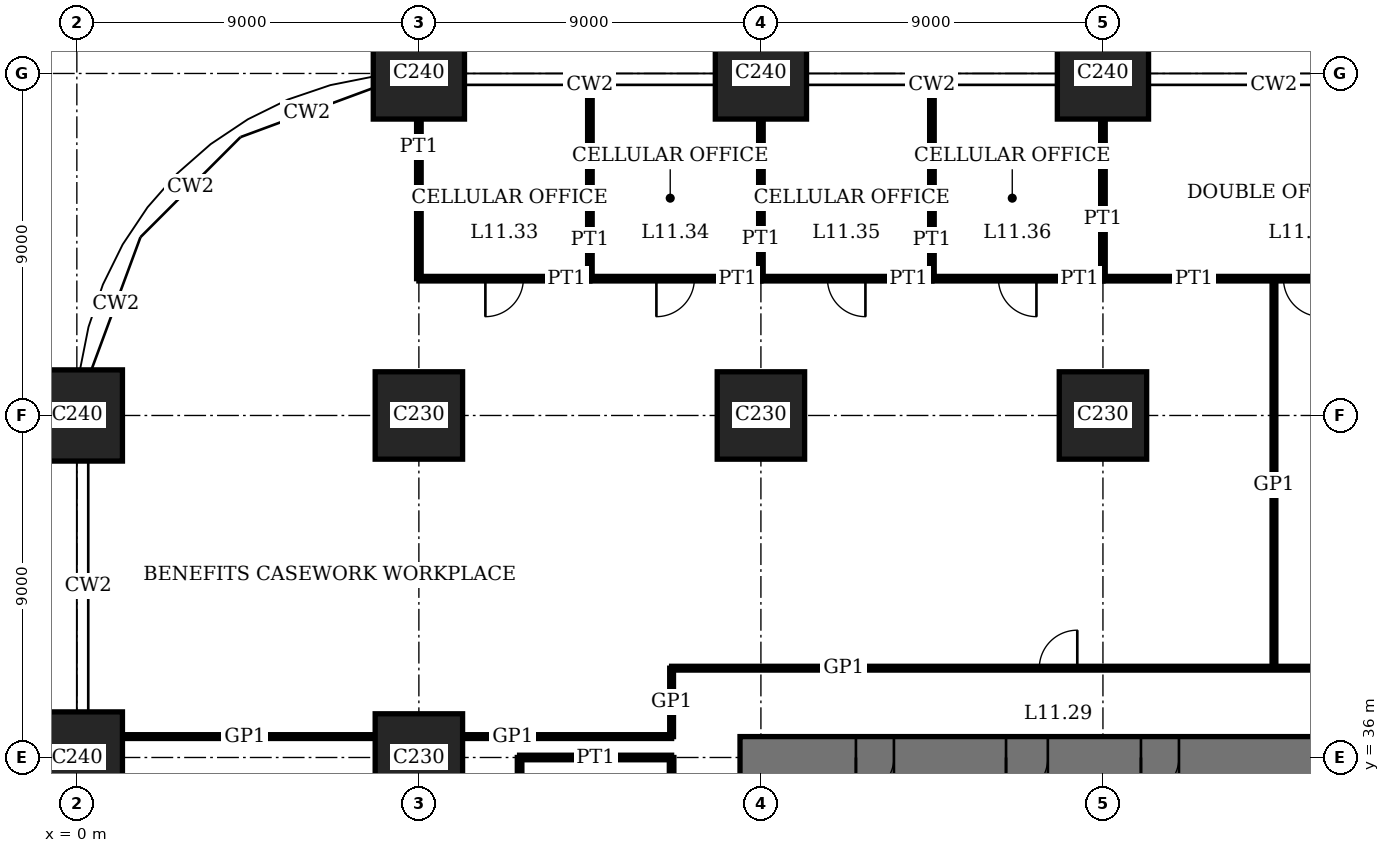
"""IFC4 building model, lengths in metres.
Left out: names, types, materials, properties, quantities, classifications, styles, units other than length and angle.
Written with IfcOpenShell. Run it as: python <this file> out.ifc"""

import sys

from ifc_helpers import new_model, si_unit, direction, frame, frame_2d, origin, origin_2d, place, context, subcontext, project, spatial, rectangle, extrude, element, fill, save


model = new_model("IFC4")
c1 = context("Model", 3, precision=1e-05, world=origin(), true_north=direction((0.0, 1.0)))
c2 = subcontext(c1, "Body", "Model", "MODEL_VIEW")
j1 = project(units=[si_unit("LENGTHUNIT", "METRE"), si_unit("PLANEANGLEUNIT", "RADIAN")], contexts=[c1])
p1 = place(None, origin())
s1 = spatial("IfcSite", under=j1, at=p1, CompositionType="ELEMENT")
p2 = place(p1, origin())
s2 = spatial("IfcBuilding", under=s1, at=p2, CompositionType="ELEMENT")
p3 = place(p2, frame((0.0, 0.0, 47.8)))
s3 = spatial("IfcBuildingStorey", under=s2, at=p3, CompositionType="ELEMENT", Elevation=47.8)
for number, where, z_axis, x_axis in (
    (1, (0.0, 36.0, 0.0), (0.0, 0.0, 1.0), (1.0, 0.0, 0.0)),
    (2, (0.0, 45.0, 0.0), (0.0, 0.0, 1.0), (1.0, 0.0, 0.0)),
):
    element("IfcColumn", number, at=place(p3, frame(where, z_axis=z_axis, x_axis=x_axis)), inside=s3, PredefinedType="COLUMN", context=c2, shape_type="SweptSolid", body=[
        extrude(rectangle(XDim=2.4, YDim=2.4, at=origin_2d()), origin(), (0.0, 0.0, 1.0), 4.0),
    ])
for number, where, z_axis, x_axis in (
    (3, (9.0, 36.0, 0.0), (0.0, 0.0, 1.0), (1.0, 0.0, 0.0)),
    (4, (9.0, 45.0, 0.0), (0.0, 0.0, 1.0), (1.0, 0.0, 0.0)),
):
    element("IfcColumn", number, at=place(p3, frame(where, z_axis=z_axis, x_axis=x_axis)), inside=s3, PredefinedType="COLUMN", context=c2, shape_type="SweptSolid", body=[
        extrude(rectangle(XDim=2.3, YDim=2.3, at=origin_2d()), origin(), (0.0, 0.0, 1.0), 4.0),
    ])
p4 = place(p3, frame((9.0, 54.0, 0.0), z_axis=(0.0, 0.0, 1.0), x_axis=(1.0, 0.0, 0.0)))
e5 = element("IfcColumn", 5, at=p4, inside=s3, PredefinedType="COLUMN", context=c2, shape_type="SweptSolid", body=[
    extrude(rectangle(XDim=2.4, YDim=2.4, at=origin_2d()), origin(), (0.0, 0.0, 1.0), 4.0),
])
p5 = place(p3, frame((18.0, 45.0, 0.0), z_axis=(0.0, 0.0, 1.0), x_axis=(1.0, 0.0, 0.0)))
e6 = element("IfcColumn", 6, at=p5, inside=s3, PredefinedType="COLUMN", context=c2, shape_type="SweptSolid", body=[
    extrude(rectangle(XDim=2.3, YDim=2.3, at=origin_2d()), origin(), (0.0, 0.0, 1.0), 4.0),
])
p6 = place(p3, frame((18.0, 54.0, 0.0), z_axis=(0.0, 0.0, 1.0), x_axis=(1.0, 0.0, 0.0)))
e7 = element("IfcColumn", 7, at=p6, inside=s3, PredefinedType="COLUMN", context=c2, shape_type="SweptSolid", body=[
    extrude(rectangle(XDim=2.4, YDim=2.4, at=origin_2d()), origin(), (0.0, 0.0, 1.0), 4.0),
])
p7 = place(p3, frame((27.0, 45.0, 0.0), z_axis=(0.0, 0.0, 1.0), x_axis=(1.0, 0.0, 0.0)))
e8 = element("IfcColumn", 8, at=p7, inside=s3, PredefinedType="COLUMN", context=c2, shape_type="SweptSolid", body=[
    extrude(rectangle(XDim=2.3, YDim=2.3, at=origin_2d()), origin(), (0.0, 0.0, 1.0), 4.0),
])
p8 = place(p3, frame((27.0, 54.0, 0.0), z_axis=(0.0, 0.0, 1.0), x_axis=(1.0, 0.0, 0.0)))
e9 = element("IfcColumn", 9, at=p8, inside=s3, PredefinedType="COLUMN", context=c2, shape_type="SweptSolid", body=[
    extrude(rectangle(XDim=2.4, YDim=2.4, at=origin_2d()), origin(), (0.0, 0.0, 1.0), 4.0),
])
p9 = place(p3, frame((45.55, 36.0, 0.0), z_axis=(0.0, 0.0, 1.0), x_axis=(-1.0, 0.0, 0.0)))
e10 = element("IfcWall", 10, at=p9, inside=s3, PredefinedType="SHEAR", context=c2, shape_type="SweptSolid", body=[
    extrude(rectangle(XDim=28.1, YDim=1.1, at=frame_2d((14.05, 0.0))), origin(), (0.0, 0.0, 1.0), 4.0),
])
p10 = place(p9, frame((11.55, 0.0, 0.0)))
e11 = element("IfcOpeningElement", 11, at=p10, cuts=e10, PredefinedType="OPENING", context=c2, shape_type="SweptSolid", body=[
    extrude(rectangle(XDim=1.0, YDim=2.4, at=frame_2d((0.5, 1.2))), frame((0.0, 0.56, 0.0), z_axis=(0.0, -1.0, 0.0), x_axis=(1.0, 0.0, 0.0)), (0.0, 0.0, 1.0), 1.12),
])
p11 = place(p9, frame((16.55, 0.0, 0.0)))
e12 = element("IfcOpeningElement", 12, at=p11, cuts=e10, PredefinedType="OPENING", context=c2, shape_type="SweptSolid", body=[
    extrude(rectangle(XDim=1.0, YDim=2.4, at=frame_2d((0.5, 1.2))), frame((0.0, 0.56, 0.0), z_axis=(0.0, -1.0, 0.0), x_axis=(1.0, 0.0, 0.0)), (0.0, 0.0, 1.0), 1.12),
])
p12 = place(p9, frame((20.0, 0.0, 0.0)))
e13 = element("IfcOpeningElement", 13, at=p12, cuts=e10, PredefinedType="OPENING", context=c2, shape_type="SweptSolid", body=[
    extrude(rectangle(XDim=1.1, YDim=2.4, at=frame_2d((0.55, 1.2))), frame((0.0, 0.56, 0.0), z_axis=(0.0, -1.0, 0.0), x_axis=(1.0, 0.0, 0.0)), (0.0, 0.0, 1.0), 1.12),
])
p13 = place(p9, frame((24.05, 0.0, 0.0)))
e14 = element("IfcOpeningElement", 14, at=p13, cuts=e10, PredefinedType="OPENING", context=c2, shape_type="SweptSolid", body=[
    extrude(rectangle(XDim=1.0, YDim=2.4, at=frame_2d((0.5, 1.2))), frame((0.0, 0.56, 0.0), z_axis=(0.0, -1.0, 0.0), x_axis=(1.0, 0.0, 0.0)), (0.0, 0.0, 1.0), 1.12),
])
p14 = place(p3, frame((11.65, 36.0, 0.0), z_axis=(0.0, 0.0, 1.0), x_axis=(1.0, 0.0, 0.0)))
e15 = element("IfcWall", 15, at=p14, inside=s3, PredefinedType="PARTITIONING", context=c2, shape_type="SweptSolid", body=[
    extrude(rectangle(XDim=4.0, YDim=0.12, at=frame_2d((2.0, 0.0))), origin(), (0.0, 0.0, 1.0), 3.05),
])
p15 = place(p3, frame((1.2, 36.55, 0.0), z_axis=(0.0, 0.0, 1.0), x_axis=(1.0, 0.0, 0.0)))
e16 = element("IfcWall", 16, at=p15, inside=s3, PredefinedType="PARTITIONING", context=c2, shape_type="SweptSolid", body=[
    extrude(rectangle(XDim=6.65, YDim=0.1, at=frame_2d((3.325, 0.0))), origin(), (0.0, 0.0, 1.0), 3.75),
])
p16 = place(p3, frame((10.15, 36.55, 0.0), z_axis=(0.0, 0.0, 1.0), x_axis=(1.0, 0.0, 0.0)))
e17 = element("IfcWall", 17, at=p16, inside=s3, PredefinedType="PARTITIONING", context=c2, shape_type="SweptSolid", body=[
    extrude(rectangle(XDim=5.5, YDim=0.1, at=frame_2d((2.75, 0.0))), origin(), (0.0, 0.0, 1.0), 3.75),
])
p17 = place(p3, frame((15.65, 38.35, 0.0), z_axis=(0.0, 0.0, 1.0), x_axis=(1.0, 0.0, 0.0)))
e18 = element("IfcWall", 18, at=p17, inside=s3, PredefinedType="PARTITIONING", context=c2, shape_type="SweptSolid", body=[
    extrude(rectangle(XDim=20.35, YDim=0.1, at=frame_2d((10.175, 0.0))), origin(), (0.0, 0.0, 1.0), 3.75),
])
p18 = place(p17, frame((9.675, 0.0, 0.0)))
e19 = element("IfcOpeningElement", 19, at=p18, cuts=e18, PredefinedType="OPENING", context=c2, shape_type="SweptSolid", body=[
    extrude(rectangle(XDim=1.0, YDim=2.4, at=frame_2d((0.5, 1.2))), frame((0.0, 0.06, 0.0), z_axis=(0.0, -1.0, 0.0), x_axis=(1.0, 0.0, 0.0)), (0.0, 0.0, 1.0), 0.12),
])
p19 = place(p3, frame((9.0, 48.6, 0.0), z_axis=(0.0, 0.0, 1.0), x_axis=(1.0, 0.0, 0.0)))
e20 = element("IfcWall", 20, at=p19, inside=s3, PredefinedType="PARTITIONING", context=c2, shape_type="SweptSolid", body=[
    extrude(rectangle(XDim=4.5, YDim=0.12, at=frame_2d((2.25, 0.0))), origin(), (0.0, 0.0, 1.0), 3.75),
])
p20 = place(p19, frame((1.75, 0.0, 0.0)))
e21 = element("IfcOpeningElement", 21, at=p20, cuts=e20, PredefinedType="OPENING", context=c2, shape_type="SweptSolid", body=[
    extrude(rectangle(XDim=1.0, YDim=2.4, at=frame_2d((0.5, 1.2))), frame((0.0, 0.07, 0.0), z_axis=(0.0, -1.0, 0.0), x_axis=(1.0, 0.0, 0.0)), (0.0, 0.0, 1.0), 0.14),
])
p21 = place(p3, frame((13.5, 48.6, 0.0), z_axis=(0.0, 0.0, 1.0), x_axis=(1.0, 0.0, 0.0)))
e22 = element("IfcWall", 22, at=p21, inside=s3, PredefinedType="PARTITIONING", context=c2, shape_type="SweptSolid", body=[
    extrude(rectangle(XDim=4.5, YDim=0.12, at=frame_2d((2.25, 0.0))), origin(), (0.0, 0.0, 1.0), 3.75),
])
p22 = place(p21, frame((1.75, 0.0, 0.0)))
e23 = element("IfcOpeningElement", 23, at=p22, cuts=e22, PredefinedType="OPENING", context=c2, shape_type="SweptSolid", body=[
    extrude(rectangle(XDim=1.0, YDim=2.4, at=frame_2d((0.5, 1.2))), frame((0.0, 0.07, 0.0), z_axis=(0.0, -1.0, 0.0), x_axis=(1.0, 0.0, 0.0)), (0.0, 0.0, 1.0), 0.14),
])
p23 = place(p3, frame((18.0, 48.6, 0.0), z_axis=(0.0, 0.0, 1.0), x_axis=(1.0, 0.0, 0.0)))
e24 = element("IfcWall", 24, at=p23, inside=s3, PredefinedType="PARTITIONING", context=c2, shape_type="SweptSolid", body=[
    extrude(rectangle(XDim=4.5, YDim=0.12, at=frame_2d((2.25, 0.0))), origin(), (0.0, 0.0, 1.0), 3.75),
])
p24 = place(p23, frame((1.75, 0.0, 0.0)))
e25 = element("IfcOpeningElement", 25, at=p24, cuts=e24, PredefinedType="OPENING", context=c2, shape_type="SweptSolid", body=[
    extrude(rectangle(XDim=1.0, YDim=2.4, at=frame_2d((0.5, 1.2))), frame((0.0, 0.07, 0.0), z_axis=(0.0, -1.0, 0.0), x_axis=(1.0, 0.0, 0.0)), (0.0, 0.0, 1.0), 0.14),
])
p25 = place(p3, frame((22.5, 48.6, 0.0), z_axis=(0.0, 0.0, 1.0), x_axis=(1.0, 0.0, 0.0)))
e26 = element("IfcWall", 26, at=p25, inside=s3, PredefinedType="PARTITIONING", context=c2, shape_type="SweptSolid", body=[
    extrude(rectangle(XDim=4.5, YDim=0.12, at=frame_2d((2.25, 0.0))), origin(), (0.0, 0.0, 1.0), 3.75),
])
p26 = place(p25, frame((1.75, 0.0, 0.0)))
e27 = element("IfcOpeningElement", 27, at=p26, cuts=e26, PredefinedType="OPENING", context=c2, shape_type="SweptSolid", body=[
    extrude(rectangle(XDim=1.0, YDim=2.4, at=frame_2d((0.5, 1.2))), frame((0.0, 0.07, 0.0), z_axis=(0.0, -1.0, 0.0), x_axis=(1.0, 0.0, 0.0)), (0.0, 0.0, 1.0), 0.14),
])
p27 = place(p3, frame((27.0, 48.6, 0.0), z_axis=(0.0, 0.0, 1.0), x_axis=(1.0, 0.0, 0.0)))
e28 = element("IfcWall", 28, at=p27, inside=s3, PredefinedType="PARTITIONING", context=c2, shape_type="SweptSolid", body=[
    extrude(rectangle(XDim=9.0, YDim=0.12, at=frame_2d((4.5, 0.0))), origin(), (0.0, 0.0, 1.0), 3.75),
])
p28 = place(p27, frame((4.75, 0.0, 0.0)))
e29 = element("IfcOpeningElement", 29, at=p28, cuts=e28, PredefinedType="OPENING", context=c2, shape_type="SweptSolid", body=[
    extrude(rectangle(XDim=1.0, YDim=2.4, at=frame_2d((0.5, 1.2))), frame((0.0, 0.07, 0.0), z_axis=(0.0, -1.0, 0.0), x_axis=(1.0, 0.0, 0.0)), (0.0, 0.0, 1.0), 0.14),
])
p29 = place(p3, frame((9.0, 48.6, 0.0), z_axis=(0.0, 0.0, 1.0), x_axis=(0.0, 1.0, 0.0)))
e30 = element("IfcWall", 30, at=p29, inside=s3, PredefinedType="PARTITIONING", context=c2, shape_type="SweptSolid", body=[
    extrude(rectangle(XDim=4.2, YDim=0.12, at=frame_2d((2.1, 0.0))), origin(), (0.0, 0.0, 1.0), 3.05),
])
p30 = place(p3, frame((11.65, 31.5, 0.0), z_axis=(0.0, 0.0, 1.0), x_axis=(0.0, 1.0, 0.0)))
e31 = element("IfcWall", 31, at=p30, inside=s3, PredefinedType="PARTITIONING", context=c2, shape_type="SweptSolid", body=[
    extrude(rectangle(XDim=4.5, YDim=0.12, at=frame_2d((2.25, 0.0))), origin(), (0.0, 0.0, 1.0), 3.75),
])
p31 = place(p30, frame((1.75, 0.0, 0.0)))
e32 = element("IfcOpeningElement", 32, at=p31, cuts=e31, PredefinedType="OPENING", context=c2, shape_type="SweptSolid", body=[
    extrude(rectangle(XDim=1.0, YDim=2.4, at=frame_2d((0.5, 1.2))), frame((0.0, 0.07, 0.0), z_axis=(0.0, -1.0, 0.0), x_axis=(1.0, 0.0, 0.0)), (0.0, 0.0, 1.0), 0.14),
])
p32 = place(p3, frame((13.5, 48.6, 0.0), z_axis=(0.0, 0.0, 1.0), x_axis=(0.0, 1.0, 0.0)))
e33 = element("IfcWall", 33, at=p32, inside=s3, PredefinedType="PARTITIONING", context=c2, shape_type="SweptSolid", body=[
    extrude(rectangle(XDim=5.09, YDim=0.12, at=frame_2d((2.545, 0.0))), origin(), (0.0, 0.0, 1.0), 3.75),
])
p33 = place(p3, frame((15.65, 31.5, 0.0), z_axis=(0.0, 0.0, 1.0), x_axis=(0.0, 1.0, 0.0)))
e34 = element("IfcWall", 34, at=p33, inside=s3, PredefinedType="PARTITIONING", context=c2, shape_type="SweptSolid", body=[
    extrude(rectangle(XDim=4.5, YDim=0.12, at=frame_2d((2.25, 0.0))), origin(), (0.0, 0.0, 1.0), 3.75),
])
p34 = place(p3, frame((15.65, 36.55, 0.0), z_axis=(0.0, 0.0, 1.0), x_axis=(0.0, 1.0, 0.0)))
e35 = element("IfcWall", 35, at=p34, inside=s3, PredefinedType="PARTITIONING", context=c2, shape_type="SweptSolid", body=[
    extrude(rectangle(XDim=1.8, YDim=0.1, at=frame_2d((0.9, 0.0))), origin(), (0.0, 0.0, 1.0), 3.75),
])
p35 = place(p3, frame((18.0, 48.6, 0.0), z_axis=(0.0, 0.0, 1.0), x_axis=(0.0, 1.0, 0.0)))
e36 = element("IfcWall", 36, at=p35, inside=s3, PredefinedType="PARTITIONING", context=c2, shape_type="SweptSolid", body=[
    extrude(rectangle(XDim=4.2, YDim=0.12, at=frame_2d((2.1, 0.0))), origin(), (0.0, 0.0, 1.0), 3.05),
])
p36 = place(p3, frame((22.5, 48.6, 0.0), z_axis=(0.0, 0.0, 1.0), x_axis=(0.0, 1.0, 0.0)))
e37 = element("IfcWall", 37, at=p36, inside=s3, PredefinedType="PARTITIONING", context=c2, shape_type="SweptSolid", body=[
    extrude(rectangle(XDim=5.09, YDim=0.12, at=frame_2d((2.545, 0.0))), origin(), (0.0, 0.0, 1.0), 3.75),
])
p37 = place(p3, frame((27.0, 48.6, 0.0), z_axis=(0.0, 0.0, 1.0), x_axis=(0.0, 1.0, 0.0)))
e38 = element("IfcWall", 38, at=p37, inside=s3, PredefinedType="PARTITIONING", context=c2, shape_type="SweptSolid", body=[
    extrude(rectangle(XDim=4.2, YDim=0.12, at=frame_2d((2.1, 0.0))), origin(), (0.0, 0.0, 1.0), 3.05),
])
p38 = place(p3, frame((31.5, 38.35, 0.0), z_axis=(0.0, 0.0, 1.0), x_axis=(0.0, 1.0, 0.0)))
e39 = element("IfcWall", 39, at=p38, inside=s3, PredefinedType="PARTITIONING", context=c2, shape_type="SweptSolid", body=[
    extrude(rectangle(XDim=10.26, YDim=0.1, at=frame_2d((5.13, 0.0))), origin(), (0.0, 0.0, 1.0), 3.75),
])
p39 = place(p11, origin())
e40 = element("IfcDoor", 40, at=p39, inside=s3, OperationType="SINGLE_SWING_LEFT", PredefinedType="DOOR", context=c2, shape_type="SweptSolid", body=[
    extrude(rectangle(XDim=1.0, YDim=2.4, at=frame_2d((0.5, 1.2))), frame((0.0, 0.025, 0.0), z_axis=(0.0, -1.0, 0.0), x_axis=(1.0, 0.0, 0.0)), (0.0, 0.0, 1.0), 0.05),
    extrude(rectangle(XDim=0.04, YDim=2.4, at=frame_2d((0.02, 1.2))), frame((0.0, 0.4, 0.0), z_axis=(0.0, -1.0, 0.0), x_axis=(1.0, 0.0, 0.0)), (0.0, 0.0, 1.0), 0.8),
    extrude(rectangle(XDim=0.04, YDim=2.4, at=frame_2d((0.98, 1.2))), frame((0.0, 0.4, 0.0), z_axis=(0.0, -1.0, 0.0), x_axis=(1.0, 0.0, 0.0)), (0.0, 0.0, 1.0), 0.8),
    extrude(rectangle(XDim=1.0, YDim=0.04, at=frame_2d((0.5, 2.38))), frame((0.0, 0.4, 0.0), z_axis=(0.0, -1.0, 0.0), x_axis=(1.0, 0.0, 0.0)), (0.0, 0.0, 1.0), 0.8),
])
fill(e12, e40)
p40 = place(p12, origin())
e41 = element("IfcDoor", 41, at=p40, inside=s3, OperationType="SINGLE_SWING_LEFT", PredefinedType="DOOR", context=c2, shape_type="SweptSolid", body=[
    extrude(rectangle(XDim=1.1, YDim=2.4, at=frame_2d((0.55, 1.2))), frame((0.0, 0.025, 0.0), z_axis=(0.0, -1.0, 0.0), x_axis=(1.0, 0.0, 0.0)), (0.0, 0.0, 1.0), 0.05),
    extrude(rectangle(XDim=0.04, YDim=2.4, at=frame_2d((0.02, 1.2))), frame((0.0, 0.44, 0.0), z_axis=(0.0, -1.0, 0.0), x_axis=(1.0, 0.0, 0.0)), (0.0, 0.0, 1.0), 0.88),
    extrude(rectangle(XDim=0.04, YDim=2.4, at=frame_2d((1.08, 1.2))), frame((0.0, 0.44, 0.0), z_axis=(0.0, -1.0, 0.0), x_axis=(1.0, 0.0, 0.0)), (0.0, 0.0, 1.0), 0.88),
    extrude(rectangle(XDim=1.1, YDim=0.04, at=frame_2d((0.55, 2.38))), frame((0.0, 0.44, 0.0), z_axis=(0.0, -1.0, 0.0), x_axis=(1.0, 0.0, 0.0)), (0.0, 0.0, 1.0), 0.88),
])
fill(e13, e41)
p41 = place(p13, origin())
e42 = element("IfcDoor", 42, at=p41, inside=s3, OperationType="SINGLE_SWING_LEFT", PredefinedType="DOOR", context=c2, shape_type="SweptSolid", body=[
    extrude(rectangle(XDim=1.0, YDim=2.4, at=frame_2d((0.5, 1.2))), frame((0.0, 0.025, 0.0), z_axis=(0.0, -1.0, 0.0), x_axis=(1.0, 0.0, 0.0)), (0.0, 0.0, 1.0), 0.05),
    extrude(rectangle(XDim=0.04, YDim=2.4, at=frame_2d((0.02, 1.2))), frame((0.0, 0.4, 0.0), z_axis=(0.0, -1.0, 0.0), x_axis=(1.0, 0.0, 0.0)), (0.0, 0.0, 1.0), 0.8),
    extrude(rectangle(XDim=0.04, YDim=2.4, at=frame_2d((0.98, 1.2))), frame((0.0, 0.4, 0.0), z_axis=(0.0, -1.0, 0.0), x_axis=(1.0, 0.0, 0.0)), (0.0, 0.0, 1.0), 0.8),
    extrude(rectangle(XDim=1.0, YDim=0.04, at=frame_2d((0.5, 2.38))), frame((0.0, 0.4, 0.0), z_axis=(0.0, -1.0, 0.0), x_axis=(1.0, 0.0, 0.0)), (0.0, 0.0, 1.0), 0.8),
])
fill(e14, e42)
p42 = place(p18, origin())
e43 = element("IfcDoor", 43, at=p42, inside=s3, OperationType="SINGLE_SWING_LEFT", PredefinedType="DOOR", context=c2, shape_type="SweptSolid", body=[
    extrude(rectangle(XDim=1.0, YDim=2.4, at=frame_2d((0.5, 1.2))), frame((0.0, 0.02, 0.0), z_axis=(0.0, -1.0, 0.0), x_axis=(1.0, 0.0, 0.0)), (0.0, 0.0, 1.0), 0.04),
])
fill(e19, e43)
p43 = place(p20, origin())
e44 = element("IfcDoor", 44, at=p43, inside=s3, OperationType="SINGLE_SWING_LEFT", PredefinedType="DOOR", context=c2, shape_type="SweptSolid", body=[
    extrude(rectangle(XDim=1.0, YDim=2.4, at=frame_2d((0.5, 1.2))), frame((0.0, 0.025, 0.0), z_axis=(0.0, -1.0, 0.0), x_axis=(1.0, 0.0, 0.0)), (0.0, 0.0, 1.0), 0.05),
])
fill(e21, e44)
p44 = place(p22, origin())
e45 = element("IfcDoor", 45, at=p44, inside=s3, OperationType="SINGLE_SWING_LEFT", PredefinedType="DOOR", context=c2, shape_type="SweptSolid", body=[
    extrude(rectangle(XDim=1.0, YDim=2.4, at=frame_2d((0.5, 1.2))), frame((0.0, 0.025, 0.0), z_axis=(0.0, -1.0, 0.0), x_axis=(1.0, 0.0, 0.0)), (0.0, 0.0, 1.0), 0.05),
])
fill(e23, e45)
p45 = place(p24, origin())
e46 = element("IfcDoor", 46, at=p45, inside=s3, OperationType="SINGLE_SWING_RIGHT", PredefinedType="DOOR", context=c2, shape_type="SweptSolid", body=[
    extrude(rectangle(XDim=1.0, YDim=2.4, at=frame_2d((0.5, 1.2))), frame((0.0, 0.025, 0.0), z_axis=(0.0, -1.0, 0.0), x_axis=(1.0, 0.0, 0.0)), (0.0, 0.0, 1.0), 0.05),
])
fill(e25, e46)
p46 = place(p26, origin())
e47 = element("IfcDoor", 47, at=p46, inside=s3, OperationType="SINGLE_SWING_RIGHT", PredefinedType="DOOR", context=c2, shape_type="SweptSolid", body=[
    extrude(rectangle(XDim=1.0, YDim=2.4, at=frame_2d((0.5, 1.2))), frame((0.0, 0.025, 0.0), z_axis=(0.0, -1.0, 0.0), x_axis=(1.0, 0.0, 0.0)), (0.0, 0.0, 1.0), 0.05),
])
fill(e27, e47)
p47 = place(p28, origin())
e48 = element("IfcDoor", 48, at=p47, inside=s3, OperationType="SINGLE_SWING_RIGHT", PredefinedType="DOOR", context=c2, shape_type="SweptSolid", body=[
    extrude(rectangle(XDim=1.0, YDim=2.4, at=frame_2d((0.5, 1.2))), frame((0.0, 0.025, 0.0), z_axis=(0.0, -1.0, 0.0), x_axis=(1.0, 0.0, 0.0)), (0.0, 0.0, 1.0), 0.05),
])
fill(e29, e48)
save(model, sys.argv[1])
